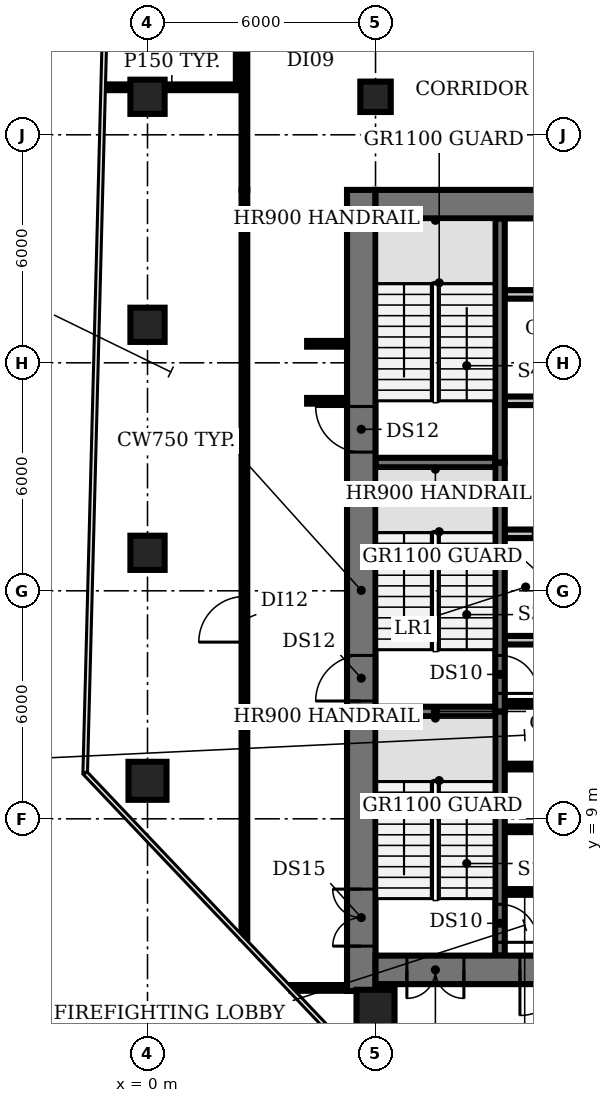
"""IFC4 building model, lengths in metres.
Left out: names, types, materials, properties, quantities, classifications, styles, units other than length and angle.
Written with IfcOpenShell. Run it as: python <this file> out.ifc"""

import sys

from ifc_helpers import new_model, si_unit, direction, frame, frame_2d, origin, origin_2d, place, context, subcontext, project, spatial, rectangle, circle, extrude, element, fill, save


model = new_model("IFC4")
c1 = context("Model", 3, precision=1e-05, world=origin(), true_north=direction((0.0, 1.0)))
c2 = subcontext(c1, "Body", "Model", "MODEL_VIEW")
j1 = project(units=[si_unit("LENGTHUNIT", "METRE"), si_unit("PLANEANGLEUNIT", "RADIAN")], contexts=[c1])
p1 = place(None, origin())
s1 = spatial("IfcSite", under=j1, at=p1, CompositionType="ELEMENT")
p2 = place(p1, origin())
s2 = spatial("IfcBuilding", under=s1, at=p2, CompositionType="ELEMENT")
p3 = place(p2, frame((0.0, 0.0, 117.2)))
s3 = spatial("IfcBuildingStorey", under=s2, at=p3, CompositionType="ELEMENT", Elevation=117.2)
p4 = place(p3, frame((0.0, 10.0, 0.0), z_axis=(0.0, 0.0, 1.0), x_axis=(1.0, 0.0, 0.0)))
e1 = element("IfcColumn", 1, at=p4, inside=s3, PredefinedType="COLUMN", context=c2, shape_type="SweptSolid", body=[
    extrude(circle(Radius=0.5, at=origin_2d()), origin(), (0.0, 0.0, 1.0), 3.85),
])
for number, where, z_axis, x_axis in (
    (2, (0.0, 16.0, 0.0), (0.0, 0.0, 1.0), (1.0, 0.0, 0.0)),
    (3, (0.0, 22.0, 0.0), (0.0, 0.0, 1.0), (1.0, 0.0, 0.0)),
    (4, (0.0, 28.0, 0.0), (0.0, 0.0, 1.0), (1.0, 0.0, 0.0)),
):
    element("IfcColumn", number, at=place(p3, frame(where, z_axis=z_axis, x_axis=x_axis)), inside=s3, PredefinedType="COLUMN", context=c2, shape_type="SweptSolid", body=[
        extrude(rectangle(XDim=0.9, YDim=0.9, at=origin_2d()), origin(), (0.0, 0.0, 1.0), 3.85),
    ])
p5 = place(p3, frame((6.0, 4.0, 0.0), z_axis=(0.0, 0.0, 1.0), x_axis=(1.0, 0.0, 0.0)))
e5 = element("IfcColumn", 5, at=p5, inside=s3, PredefinedType="COLUMN", context=c2, shape_type="SweptSolid", body=[
    extrude(circle(Radius=0.5, at=origin_2d()), origin(), (0.0, 0.0, 1.0), 3.85),
])
p6 = place(p3, frame((6.0, 28.0, 0.0), z_axis=(0.0, 0.0, 1.0), x_axis=(1.0, 0.0, 0.0)))
e6 = element("IfcColumn", 6, at=p6, inside=s3, PredefinedType="COLUMN", context=c2, shape_type="SweptSolid", body=[
    extrude(rectangle(XDim=0.8, YDim=0.8, at=origin_2d()), origin(), (0.0, 0.0, 1.0), 3.85),
])
for number, where, z_axis, x_axis in (
    (7, (9.4, 7.075, 0.0), (0.0, 0.0, 1.0), (1.0, 0.0, 0.0)),
    (8, (9.4, 8.725, 0.0), (0.0, 0.0, 1.0), (1.0, 0.0, 0.0)),
    (9, (9.4, 10.375, 0.0), (0.0, 0.0, 1.0), (1.0, 0.0, 0.0)),
):
    element("IfcWall", number, at=place(p3, frame(where, z_axis=z_axis, x_axis=x_axis)), inside=s3, PredefinedType="SHEAR", context=c2, shape_type="SweptSolid", body=[
        extrude(rectangle(XDim=1.05, YDim=0.15, at=frame_2d((0.525, 0.0))), origin(), (0.0, 0.0, 1.0), 3.85),
    ])
p7 = place(p3, frame((6.0, 11.825, 0.0), z_axis=(0.0, 0.0, 1.0), x_axis=(1.0, 0.0, 0.0)))
e10 = element("IfcWall", 10, at=p7, inside=s3, PredefinedType="SHEAR", context=c2, shape_type="SweptSolid", body=[
    extrude(rectangle(XDim=3.15, YDim=0.25, at=frame_2d((1.575, 0.0))), origin(), (0.0, 0.0, 1.0), 3.85),
])
p8 = place(p3, frame((9.4, 12.025, 0.0), z_axis=(0.0, 0.0, 1.0), x_axis=(1.0, 0.0, 0.0)))
e11 = element("IfcWall", 11, at=p8, inside=s3, PredefinedType="SHEAR", context=c2, shape_type="SweptSolid", body=[
    extrude(rectangle(XDim=1.05, YDim=0.15, at=frame_2d((0.525, 0.0))), origin(), (0.0, 0.0, 1.0), 3.85),
])
p9 = place(p3, frame((9.4, 13.7, 0.0), z_axis=(0.0, 0.0, 1.0), x_axis=(1.0, 0.0, 0.0)))
e12 = element("IfcWall", 12, at=p9, inside=s3, PredefinedType="PARTITIONING", context=c2, shape_type="SweptSolid", body=[
    extrude(rectangle(XDim=4.0, YDim=0.225, at=frame_2d((2.0, 0.0))), origin(), (0.0, 0.0, 1.0), 3.85),
])
p10 = place(p3, frame((9.4, 16.5, 0.0), z_axis=(0.0, 0.0, 1.0), x_axis=(1.0, 0.0, 0.0)))
e13 = element("IfcWall", 13, at=p10, inside=s3, PredefinedType="PARTITIONING", context=c2, shape_type="SweptSolid", body=[
    extrude(rectangle(XDim=14.6, YDim=0.225, at=frame_2d((7.3, 0.0))), origin(), (0.0, 0.0, 1.0), 3.85),
])
p11 = place(p10, frame((0.75, 0.0, 0.0)))
e14 = element("IfcOpeningElement", 14, at=p11, cuts=e13, PredefinedType="OPENING", context=c2, shape_type="SweptSolid", body=[
    extrude(rectangle(XDim=1.1, YDim=2.1, at=frame_2d((0.55, 1.05))), frame((0.0, 0.123, 0.0), z_axis=(0.0, -1.0, 0.0), x_axis=(1.0, 0.0, 0.0)), (0.0, 0.0, 1.0), 0.245),
])
p12 = place(p10, frame((3.55, 0.0, 0.0)))
e15 = element("IfcOpeningElement", 15, at=p12, cuts=e13, PredefinedType="OPENING", context=c2, shape_type="SweptSolid", body=[
    extrude(rectangle(XDim=1.1, YDim=2.1, at=frame_2d((0.55, 1.05))), frame((0.0, 0.123, 0.0), z_axis=(0.0, -1.0, 0.0), x_axis=(1.0, 0.0, 0.0)), (0.0, 0.0, 1.0), 0.245),
])
p13 = place(p10, frame((6.35, 0.0, 0.0)))
e16 = element("IfcOpeningElement", 16, at=p13, cuts=e13, PredefinedType="OPENING", context=c2, shape_type="SweptSolid", body=[
    extrude(rectangle(XDim=1.1, YDim=2.1, at=frame_2d((0.55, 1.05))), frame((0.0, 0.123, 0.0), z_axis=(0.0, -1.0, 0.0), x_axis=(1.0, 0.0, 0.0)), (0.0, 0.0, 1.0), 0.245),
])
p14 = place(p10, frame((9.15, 0.0, 0.0)))
e17 = element("IfcOpeningElement", 17, at=p14, cuts=e13, PredefinedType="OPENING", context=c2, shape_type="SweptSolid", body=[
    extrude(rectangle(XDim=1.1, YDim=2.1, at=frame_2d((0.55, 1.05))), frame((0.0, 0.123, 0.0), z_axis=(0.0, -1.0, 0.0), x_axis=(1.0, 0.0, 0.0)), (0.0, 0.0, 1.0), 0.245),
])
p15 = place(p10, frame((11.308, 0.0, 0.0)))
e18 = element("IfcOpeningElement", 18, at=p15, cuts=e13, PredefinedType="OPENING", context=c2, shape_type="SweptSolid", body=[
    extrude(rectangle(XDim=0.9, YDim=2.1, at=frame_2d((0.45, 1.05))), frame((0.0, 0.123, 0.0), z_axis=(0.0, -1.0, 0.0), x_axis=(1.0, 0.0, 0.0)), (0.0, 0.0, 1.0), 0.245),
])
p16 = place(p10, frame((13.083, 0.0, 0.0)))
e19 = element("IfcOpeningElement", 19, at=p16, cuts=e13, PredefinedType="OPENING", context=c2, shape_type="SweptSolid", body=[
    extrude(rectangle(XDim=0.9, YDim=2.1, at=frame_2d((0.45, 1.05))), frame((0.0, 0.123, 0.0), z_axis=(0.0, -1.0, 0.0), x_axis=(1.0, 0.0, 0.0)), (0.0, 0.0, 1.0), 0.245),
])
p17 = place(p3, frame((6.0, 18.375, 0.0), z_axis=(0.0, 0.0, 1.0), x_axis=(1.0, 0.0, 0.0)))
e20 = element("IfcWall", 20, at=p17, inside=s3, PredefinedType="SHEAR", context=c2, shape_type="SweptSolid", body=[
    extrude(rectangle(XDim=3.15, YDim=0.25, at=frame_2d((1.575, 0.0))), origin(), (0.0, 0.0, 1.0), 3.85),
])
p18 = place(p3, frame((24.0, 20.0, 0.0), z_axis=(0.0, 0.0, 1.0), x_axis=(-1.0, 0.0, 0.0)))
e21 = element("IfcWall", 21, at=p18, inside=s3, PredefinedType="PARTITIONING", context=c2, shape_type="SweptSolid", body=[
    extrude(rectangle(XDim=14.6, YDim=0.225, at=frame_2d((7.3, 0.0))), origin(), (0.0, 0.0, 1.0), 3.85),
])
p19 = place(p18, frame((12.2, 0.0, 0.0)))
e22 = element("IfcOpeningElement", 22, at=p19, cuts=e21, PredefinedType="OPENING", context=c2, shape_type="SweptSolid", body=[
    extrude(rectangle(XDim=1.0, YDim=2.1, at=frame_2d((0.5, 1.05))), frame((0.0, 0.123, 0.0), z_axis=(0.0, -1.0, 0.0), x_axis=(1.0, 0.0, 0.0)), (0.0, 0.0, 1.0), 0.245),
])
p20 = place(p18, frame((9.025, 0.0, 0.0)))
e23 = element("IfcOpeningElement", 23, at=p20, cuts=e21, PredefinedType="OPENING", context=c2, shape_type="SweptSolid", body=[
    extrude(rectangle(XDim=0.9, YDim=2.1, at=frame_2d((0.45, 1.05))), frame((0.0, 0.123, 0.0), z_axis=(0.0, -1.0, 0.0), x_axis=(1.0, 0.0, 0.0)), (0.0, 0.0, 1.0), 0.245),
])
p21 = place(p18, frame((5.375, 0.0, 0.0)))
e24 = element("IfcOpeningElement", 24, at=p21, cuts=e21, PredefinedType="OPENING", context=c2, shape_type="SweptSolid", body=[
    extrude(rectangle(XDim=1.0, YDim=2.1, at=frame_2d((0.5, 1.05))), frame((0.0, 0.123, 0.0), z_axis=(0.0, -1.0, 0.0), x_axis=(1.0, 0.0, 0.0)), (0.0, 0.0, 1.0), 0.245),
])
p22 = place(p18, frame((2.308, 0.0, 0.0)))
e25 = element("IfcOpeningElement", 25, at=p22, cuts=e21, PredefinedType="OPENING", context=c2, shape_type="SweptSolid", body=[
    extrude(rectangle(XDim=0.9, YDim=2.1, at=frame_2d((0.45, 1.05))), frame((0.0, 0.123, 0.0), z_axis=(0.0, -1.0, 0.0), x_axis=(1.0, 0.0, 0.0)), (0.0, 0.0, 1.0), 0.245),
])
p23 = place(p18, frame((0.532, 0.0, 0.0)))
e26 = element("IfcOpeningElement", 26, at=p23, cuts=e21, PredefinedType="OPENING", context=c2, shape_type="SweptSolid", body=[
    extrude(rectangle(XDim=0.9, YDim=2.1, at=frame_2d((0.45, 1.05))), frame((0.0, 0.123, 0.0), z_axis=(0.0, -1.0, 0.0), x_axis=(1.0, 0.0, 0.0)), (0.0, 0.0, 1.0), 0.245),
])
p24 = place(p3, frame((9.4, 22.8, 0.0), z_axis=(0.0, 0.0, 1.0), x_axis=(1.0, 0.0, 0.0)))
e27 = element("IfcWall", 27, at=p24, inside=s3, PredefinedType="PARTITIONING", context=c2, shape_type="SweptSolid", body=[
    extrude(rectangle(XDim=14.6, YDim=0.225, at=frame_2d((7.3, 0.0))), origin(), (0.0, 0.0, 1.0), 3.85),
])
p25 = place(p3, frame((9.275, 11.825, 0.0), z_axis=(0.0, 0.0, 1.0), x_axis=(0.0, -1.0, 0.0)))
e28 = element("IfcWall", 28, at=p25, inside=s3, PredefinedType="SHEAR", context=c2, shape_type="SweptSolid", body=[
    extrude(rectangle(XDim=6.425, YDim=0.25, at=frame_2d((3.212, 0.0))), origin(), (0.0, 0.0, 1.0), 3.85),
])
p26 = place(p25, frame((5.075, 0.0, 0.0)))
e29 = element("IfcOpeningElement", 29, at=p26, cuts=e28, PredefinedType="OPENING", context=c2, shape_type="SweptSolid", body=[
    extrude(rectangle(XDim=1.0, YDim=2.1, at=frame_2d((0.5, 1.05))), frame((0.0, 0.135, 0.0), z_axis=(0.0, -1.0, 0.0), x_axis=(1.0, 0.0, 0.0)), (0.0, 0.0, 1.0), 0.27),
])
p27 = place(p3, frame((9.275, 18.375, 0.0), z_axis=(0.0, 0.0, 1.0), x_axis=(0.0, -1.0, 0.0)))
e30 = element("IfcWall", 30, at=p27, inside=s3, PredefinedType="SHEAR", context=c2, shape_type="SweptSolid", body=[
    extrude(rectangle(XDim=6.55, YDim=0.25, at=frame_2d((3.275, 0.0))), origin(), (0.0, 0.0, 1.0), 3.85),
])
p28 = place(p27, frame((5.075, 0.0, 0.0)))
e31 = element("IfcOpeningElement", 31, at=p28, cuts=e30, PredefinedType="OPENING", context=c2, shape_type="SweptSolid", body=[
    extrude(rectangle(XDim=1.0, YDim=2.1, at=frame_2d((0.5, 1.05))), frame((0.0, 0.135, 0.0), z_axis=(0.0, -1.0, 0.0), x_axis=(1.0, 0.0, 0.0)), (0.0, 0.0, 1.0), 0.27),
])
p29 = place(p3, frame((9.275, 18.375, 0.0), z_axis=(0.0, 0.0, 1.0), x_axis=(0.0, 1.0, 0.0)))
e32 = element("IfcWall", 32, at=p29, inside=s3, PredefinedType="SHEAR", context=c2, shape_type="SweptSolid", body=[
    extrude(rectangle(XDim=6.425, YDim=0.25, at=frame_2d((3.212, 0.0))), origin(), (0.0, 0.0, 1.0), 3.85),
])
p30 = place(p3, frame((5.625, 4.47, 0.0), z_axis=(0.0, 0.0, 1.0), x_axis=(0.0, 1.0, 0.0)))
e33 = element("IfcWall", 33, at=p30, inside=s3, PredefinedType="SHEAR", context=c2, shape_type="SweptSolid", body=[
    extrude(rectangle(XDim=21.08, YDim=0.75, at=frame_2d((10.54, 0.0))), origin(), (0.0, 0.0, 1.0), 3.85),
])
p31 = place(p30, frame((1.18, 0.0, 0.0)))
e34 = element("IfcOpeningElement", 34, at=p31, cuts=e33, PredefinedType="OPENING", context=c2, shape_type="SweptSolid", body=[
    extrude(rectangle(XDim=1.5, YDim=2.1, at=frame_2d((0.75, 1.05))), frame((0.0, 0.385, 0.0), z_axis=(0.0, -1.0, 0.0), x_axis=(1.0, 0.0, 0.0)), (0.0, 0.0, 1.0), 0.77),
])
p32 = place(p30, frame((7.63, 0.0, 0.0)))
e35 = element("IfcOpeningElement", 35, at=p32, cuts=e33, PredefinedType="OPENING", context=c2, shape_type="SweptSolid", body=[
    extrude(rectangle(XDim=1.2, YDim=2.1, at=frame_2d((0.6, 1.05))), frame((0.0, 0.385, 0.0), z_axis=(0.0, -1.0, 0.0), x_axis=(1.0, 0.0, 0.0)), (0.0, 0.0, 1.0), 0.77),
])
p33 = place(p30, frame((14.18, 0.0, 0.0)))
e36 = element("IfcOpeningElement", 36, at=p33, cuts=e33, PredefinedType="OPENING", context=c2, shape_type="SweptSolid", body=[
    extrude(rectangle(XDim=1.2, YDim=2.1, at=frame_2d((0.6, 1.05))), frame((0.0, 0.385, 0.0), z_axis=(0.0, -1.0, 0.0), x_axis=(1.0, 0.0, 0.0)), (0.0, 0.0, 1.0), 0.77),
])
p34 = place(p3, frame((24.0, 5.025, 0.0), z_axis=(0.0, 0.0, 1.0), x_axis=(-1.0, 0.0, 0.0)))
e37 = element("IfcWall", 37, at=p34, inside=s3, PredefinedType="SHEAR", context=c2, shape_type="SweptSolid", body=[
    extrude(rectangle(XDim=18.0, YDim=0.75, at=frame_2d((9.0, 0.0))), origin(), (0.0, 0.0, 1.0), 3.85),
])
p35 = place(p34, frame((0.825, 0.0, 0.0)))
e38 = element("IfcOpeningElement", 38, at=p35, cuts=e37, PredefinedType="OPENING", context=c2, shape_type="SweptSolid", body=[
    extrude(rectangle(XDim=1.5, YDim=2.1, at=frame_2d((0.75, 1.05))), frame((0.0, 0.385, 0.0), z_axis=(0.0, -1.0, 0.0), x_axis=(1.0, 0.0, 0.0)), (0.0, 0.0, 1.0), 0.77),
])
p36 = place(p34, frame((15.675, 0.0, 0.0)))
e39 = element("IfcOpeningElement", 39, at=p36, cuts=e37, PredefinedType="OPENING", context=c2, shape_type="SweptSolid", body=[
    extrude(rectangle(XDim=1.5, YDim=2.1, at=frame_2d((0.75, 1.05))), frame((0.0, 0.385, 0.0), z_axis=(0.0, -1.0, 0.0), x_axis=(1.0, 0.0, 0.0)), (0.0, 0.0, 1.0), 0.77),
])
p37 = place(p34, frame((13.0, 0.0, 0.0)))
e40 = element("IfcOpeningElement", 40, at=p37, cuts=e37, PredefinedType="OPENING", context=c2, shape_type="SweptSolid", body=[
    extrude(rectangle(XDim=1.2, YDim=2.1, at=frame_2d((0.6, 1.05))), frame((0.0, 0.385, 0.0), z_axis=(0.0, -1.0, 0.0), x_axis=(1.0, 0.0, 0.0)), (0.0, 0.0, 1.0), 0.77),
])
p38 = place(p34, frame((4.35, 0.0, 0.0)))
e41 = element("IfcOpeningElement", 41, at=p38, cuts=e37, PredefinedType="OPENING", context=c2, shape_type="SweptSolid", body=[
    extrude(rectangle(XDim=1.0, YDim=2.1, at=frame_2d((0.5, 1.05))), frame((0.0, 0.385, 0.0), z_axis=(0.0, -1.0, 0.0), x_axis=(1.0, 0.0, 0.0)), (0.0, 0.0, 1.0), 0.77),
])
p39 = place(p3, frame((6.0, 25.175, 0.0), z_axis=(0.0, 0.0, 1.0), x_axis=(1.0, 0.0, 0.0)))
e42 = element("IfcWall", 42, at=p39, inside=s3, PredefinedType="SHEAR", context=c2, shape_type="SweptSolid", body=[
    extrude(rectangle(XDim=18.0, YDim=0.75, at=frame_2d((9.0, 0.0))), origin(), (0.0, 0.0, 1.0), 3.85),
])
p40 = place(p3, frame((-1.12, 28.25, 0.0), z_axis=(0.0, 0.0, 1.0), x_axis=(1.0, 0.0, 0.0)))
e43 = element("IfcWall", 43, at=p40, inside=s3, PredefinedType="PARTITIONING", context=c2, shape_type="SweptSolid", body=[
    extrude(rectangle(XDim=3.52, YDim=0.15, at=frame_2d((1.76, 0.0))), origin(), (0.0, 0.0, 1.0), 2.83),
])
p41 = place(p3, frame((2.4, 28.25, 0.0), z_axis=(0.0, 0.0, 1.0), x_axis=(0.0, 1.0, 0.0)))
e44 = element("IfcWall", 44, at=p41, inside=s3, PredefinedType="PARTITIONING", context=c2, shape_type="SweptSolid", body=[
    extrude(rectangle(XDim=6.0, YDim=0.15, at=frame_2d((3.0, 0.0))), origin(), (0.0, 0.0, 1.0), 2.83),
])
p42 = place(p3, frame((2.55, 5.86, 0.0), z_axis=(0.0, 0.0, 1.0), x_axis=(0.0, 1.0, 0.0)))
e45 = element("IfcWall", 45, at=p42, inside=s3, PredefinedType="PARTITIONING", context=c2, shape_type="SweptSolid", body=[
    extrude(rectangle(XDim=19.69, YDim=0.15, at=frame_2d((9.845, 0.0))), origin(), (0.0, 0.0, 1.0), 2.83),
])
p43 = place(p42, frame((7.79, 0.0, 0.0)))
e46 = element("IfcOpeningElement", 46, at=p43, cuts=e45, PredefinedType="OPENING", context=c2, shape_type="SweptSolid", body=[
    extrude(rectangle(XDim=1.2, YDim=2.1, at=frame_2d((0.6, 1.05))), frame((0.0, 0.085, 0.0), z_axis=(0.0, -1.0, 0.0), x_axis=(1.0, 0.0, 0.0)), (0.0, 0.0, 1.0), 0.17),
])
p44 = place(p3, frame((2.55, 25.55, 0.0), z_axis=(0.0, 0.0, 1.0), x_axis=(0.0, 1.0, 0.0)))
e47 = element("IfcWall", 47, at=p44, inside=s3, PredefinedType="PARTITIONING", context=c2, shape_type="SweptSolid", body=[
    extrude(rectangle(XDim=3.9, YDim=0.15, at=frame_2d((1.95, 0.0))), origin(), (0.0, 0.0, 1.0), 2.83),
])
p45 = place(p3, frame((3.79, 4.55, 0.0), z_axis=(0.0, 0.0, 1.0), x_axis=(1.0, 0.0, 0.0)))
e48 = element("IfcWall", 48, at=p45, inside=s3, PredefinedType="PARTITIONING", context=c2, shape_type="SweptSolid", body=[
    extrude(rectangle(XDim=1.36, YDim=0.15, at=frame_2d((0.68, 0.0))), origin(), (0.0, 0.0, 1.0), 2.83),
])
for number, where, z_axis, x_axis in (
    (49, (4.2, 20.0, 0.0), (0.0, 0.0, 1.0), (1.0, 0.0, 0.0)),
    (50, (4.2, 21.5, 0.0), (0.0, 0.0, 1.0), (1.0, 0.0, 0.0)),
):
    element("IfcWall", number, at=place(p3, frame(where, z_axis=z_axis, x_axis=x_axis)), inside=s3, PredefinedType="PARTITIONING", context=c2, shape_type="SweptSolid", body=[
        extrude(rectangle(XDim=1.05, YDim=0.15, at=frame_2d((0.525, 0.0))), origin(), (0.0, 0.0, 1.0), 2.83),
    ])
p46 = place(p26, origin())
e51 = element("IfcDoor", 51, at=p46, inside=s3, OperationType="SINGLE_SWING_RIGHT", PredefinedType="DOOR", context=c2, shape_type="SweptSolid", body=[
    extrude(rectangle(XDim=1.0, YDim=2.1, at=frame_2d((0.5, 1.05))), frame((0.0, 0.025, 0.0), z_axis=(0.0, -1.0, 0.0), x_axis=(1.0, 0.0, 0.0)), (0.0, 0.0, 1.0), 0.05),
])
fill(e29, e51)
p47 = place(p28, origin())
e52 = element("IfcDoor", 52, at=p47, inside=s3, OperationType="SINGLE_SWING_RIGHT", PredefinedType="DOOR", context=c2, shape_type="SweptSolid", body=[
    extrude(rectangle(XDim=1.0, YDim=2.1, at=frame_2d((0.5, 1.05))), frame((0.0, 0.025, 0.0), z_axis=(0.0, -1.0, 0.0), x_axis=(1.0, 0.0, 0.0)), (0.0, 0.0, 1.0), 0.05),
])
fill(e31, e52)
p48 = place(p31, origin())
e53 = element("IfcDoor", 53, at=p48, inside=s3, OperationType="DOUBLE_DOOR_SINGLE_SWING", PredefinedType="DOOR", context=c2, shape_type="SweptSolid", body=[
    extrude(rectangle(XDim=1.5, YDim=2.1, at=frame_2d((0.75, 1.05))), frame((0.0, 0.025, 0.0), z_axis=(0.0, -1.0, 0.0), x_axis=(1.0, 0.0, 0.0)), (0.0, 0.0, 1.0), 0.05),
])
fill(e34, e53)
p49 = place(p32, origin())
e54 = element("IfcDoor", 54, at=p49, inside=s3, OperationType="SINGLE_SWING_LEFT", PredefinedType="DOOR", context=c2, shape_type="SweptSolid", body=[
    extrude(rectangle(XDim=1.2, YDim=2.1, at=frame_2d((0.6, 1.05))), frame((0.0, 0.025, 0.0), z_axis=(0.0, -1.0, 0.0), x_axis=(1.0, 0.0, 0.0)), (0.0, 0.0, 1.0), 0.05),
])
fill(e35, e54)
p50 = place(p33, origin())
e55 = element("IfcDoor", 55, at=p50, inside=s3, OperationType="SINGLE_SWING_RIGHT", PredefinedType="DOOR", context=c2, shape_type="SweptSolid", body=[
    extrude(rectangle(XDim=1.2, YDim=2.1, at=frame_2d((0.6, 1.05))), frame((0.0, 0.025, 0.0), z_axis=(0.0, -1.0, 0.0), x_axis=(1.0, 0.0, 0.0)), (0.0, 0.0, 1.0), 0.05),
])
fill(e36, e55)
p51 = place(p36, origin())
e56 = element("IfcDoor", 56, at=p51, inside=s3, OperationType="DOUBLE_DOOR_SINGLE_SWING", PredefinedType="DOOR", context=c2, shape_type="SweptSolid", body=[
    extrude(rectangle(XDim=1.5, YDim=2.1, at=frame_2d((0.75, 1.05))), frame((0.0, 0.025, 0.0), z_axis=(0.0, -1.0, 0.0), x_axis=(1.0, 0.0, 0.0)), (0.0, 0.0, 1.0), 0.05),
])
fill(e39, e56)
p52 = place(p37, origin())
e57 = element("IfcDoor", 57, at=p52, inside=s3, OperationType="SINGLE_SWING_RIGHT", PredefinedType="DOOR", context=c2, shape_type="SweptSolid", body=[
    extrude(rectangle(XDim=1.2, YDim=2.1, at=frame_2d((0.6, 1.05))), frame((0.0, 0.025, 0.0), z_axis=(0.0, -1.0, 0.0), x_axis=(1.0, 0.0, 0.0)), (0.0, 0.0, 1.0), 0.05),
])
fill(e40, e57)
p53 = place(p43, origin())
e58 = element("IfcDoor", 58, at=p53, inside=s3, OperationType="SINGLE_SWING_LEFT", PredefinedType="DOOR", context=c2, shape_type="SweptSolid", body=[
    extrude(rectangle(XDim=1.2, YDim=2.1, at=frame_2d((0.6, 1.05))), frame((0.0, 0.025, 0.0), z_axis=(0.0, -1.0, 0.0), x_axis=(1.0, 0.0, 0.0)), (0.0, 0.0, 1.0), 0.05),
])
fill(e46, e58)
save(model, sys.argv[1])
